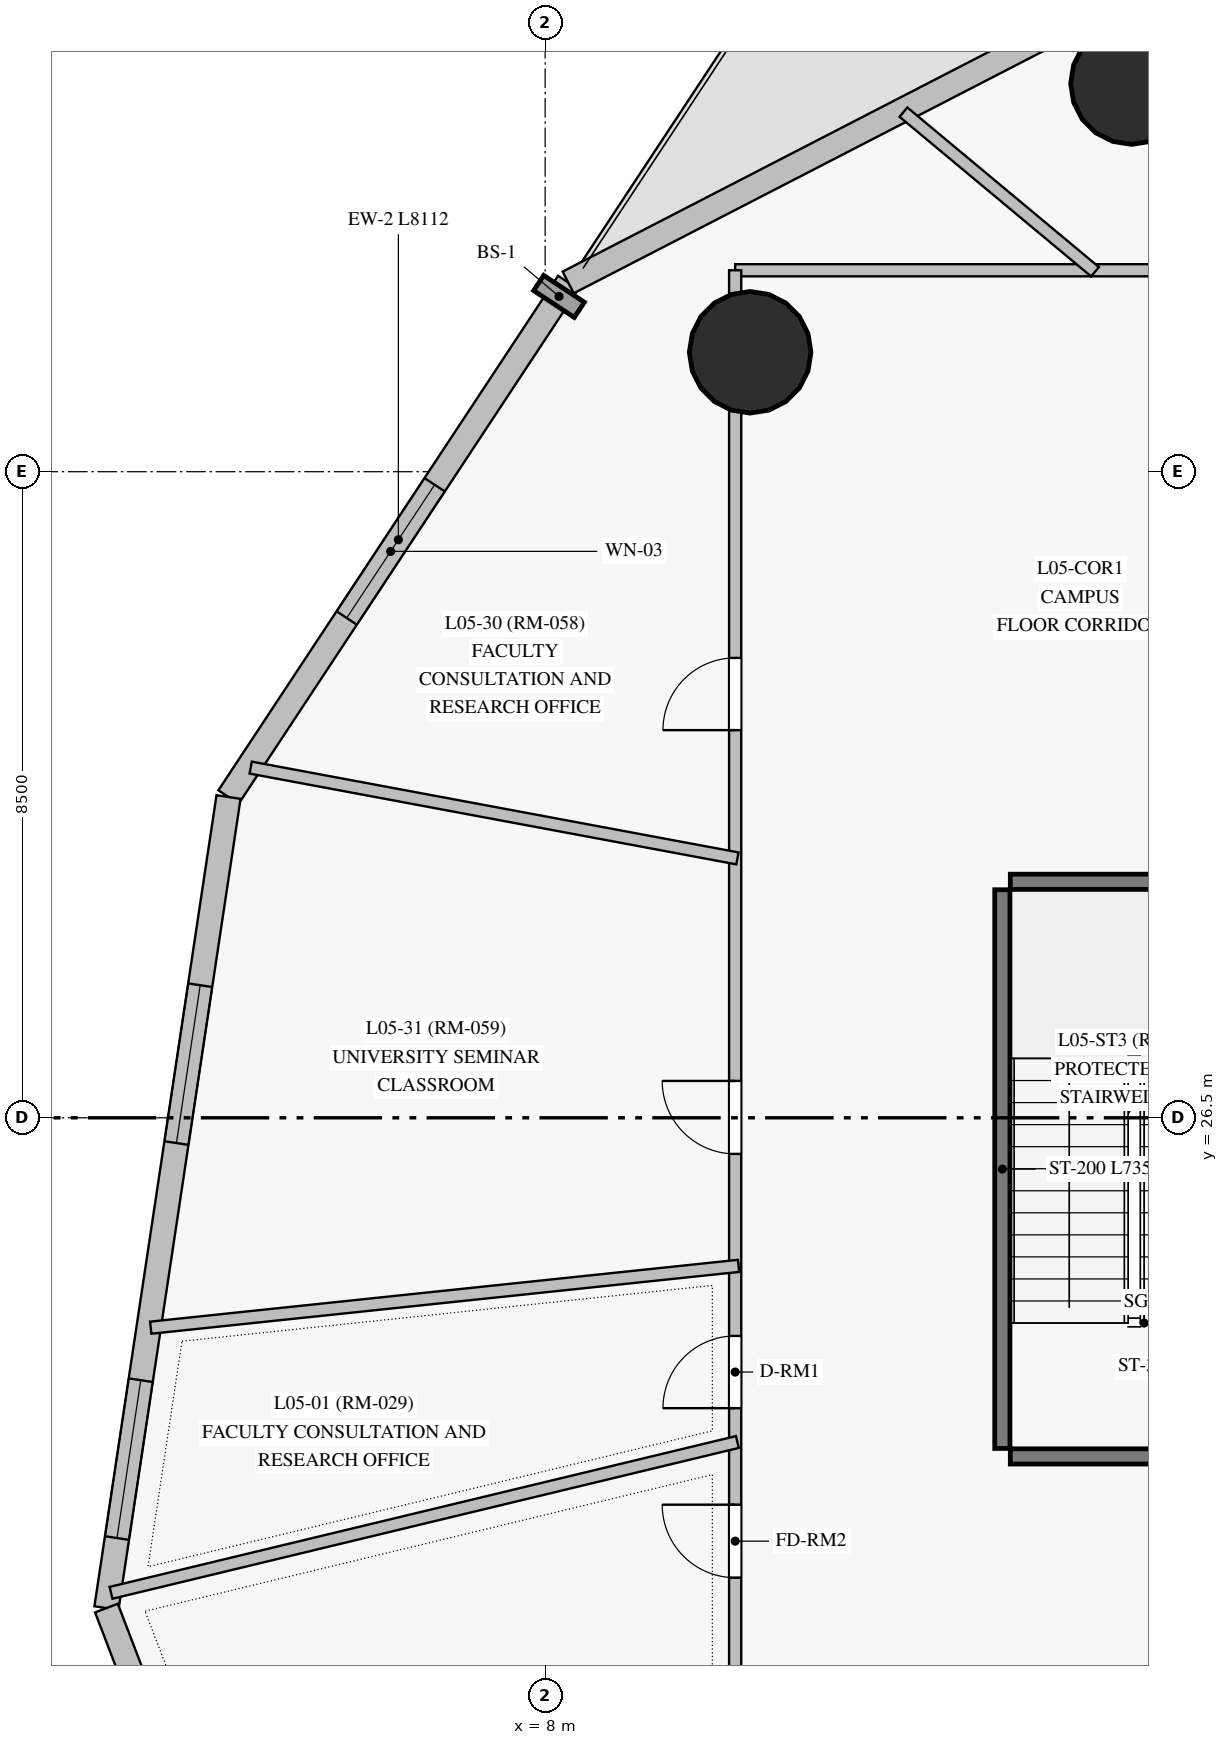
"""IFC4 building model, lengths in metres.
Left out: names, types, materials, properties, quantities, classifications, styles, units other than length and angle.
Written with IfcOpenShell. Run it as: python <this file> out.ifc"""

import sys

from ifc_helpers import new_model, si_unit, direction, frame, frame_2d, origin, origin_with_axes, origin_2d, place, context, subcontext, project, spatial, rectangle, circle, extrude, source, transform, mapped, element, fill, save


model = new_model("IFC4")
c1 = context("Model", 3, precision=1e-05, world=origin(), true_north=direction((0.0, 1.0)))
c2 = subcontext(c1, "Body", "Model", "MODEL_VIEW")
j1 = project(units=[si_unit("LENGTHUNIT", "METRE"), si_unit("PLANEANGLEUNIT", "RADIAN")], contexts=[c1])
p1 = place(None, origin())
s1 = spatial("IfcSite", under=j1, at=p1, CompositionType="ELEMENT")
p2 = place(p1, origin())
s2 = spatial("IfcBuilding", under=s1, at=p2, CompositionType="ELEMENT")
p3 = place(p2, frame((0.0, 0.0, 22.5)))
s3 = spatial("IfcBuildingStorey", under=s2, at=p3, CompositionType="ELEMENT", Elevation=22.5)
m1 = source(origin_with_axes(), c2, "Body", "SweptSolid", [
    extrude(circle(Radius=0.8, at=origin_2d()), origin(), (0.0, 0.0, 1.0), 4.0),
])
for number, where, z_axis, x_axis in (
    (1, (15.714, 40.106, 0.0), (0.0, 0.0, 1.0), (1.0, 0.0, 0.0)),
    (2, (10.697, 36.571, 0.0), (0.0, 0.0, 1.0), (1.0, 0.0, 0.0)),
):
    element("IfcColumn", number, at=place(p3, frame(where, z_axis=z_axis, x_axis=x_axis)), inside=s3, PredefinedType="COLUMN", context=c2, shape_type="MappedRepresentation", body=[
        mapped(m1, transform((0.0, 0.0, 0.0), scale=1.0)),
    ])
p4 = place(p3, frame((8.303, 37.49, 0.0), z_axis=(0.0, 0.0, 1.0), x_axis=(-0.550902166831, -0.83456983086, 0.0)))
e3 = element("IfcWall", 3, at=p4, inside=s3, PredefinedType="SOLIDWALL", context=c2, shape_type="SweptSolid", body=[
    extrude(rectangle(XDim=8.112, YDim=0.32, at=frame_2d((4.056, 0.0))), origin(), (0.0, 0.0, 1.0), 3.75),
])
p5 = place(p4, frame((3.189, 0.0, 0.85)))
e4 = element("IfcOpeningElement", 4, at=p5, cuts=e3, PredefinedType="OPENING", context=c2, shape_type="SweptSolid", body=[
    extrude(rectangle(XDim=2.1, YDim=1.95, at=frame_2d((1.05, 0.975))), frame((0.0, 0.17, 0.0), z_axis=(0.0, -1.0, 0.0), x_axis=(1.0, 0.0, 0.0)), (0.0, 0.0, 1.0), 0.34),
])
p6 = place(p3, frame((3.835, 30.72, 0.0), z_axis=(0.0, 0.0, 1.0), x_axis=(-0.148854906236, -0.988859048039, 0.0)))
e5 = element("IfcWall", 5, at=p6, inside=s3, PredefinedType="SOLIDWALL", context=c2, shape_type="SweptSolid", body=[
    extrude(rectangle(XDim=10.79, YDim=0.32, at=frame_2d((5.395, 0.0))), origin(), (0.0, 0.0, 1.0), 3.75),
])
p7 = place(p6, frame((2.503, 0.0, 0.85)))
e6 = element("IfcOpeningElement", 6, at=p7, cuts=e5, PredefinedType="OPENING", context=c2, shape_type="SweptSolid", body=[
    extrude(rectangle(XDim=2.1, YDim=1.95, at=frame_2d((1.05, 0.975))), frame((0.0, 0.17, 0.0), z_axis=(0.0, -1.0, 0.0), x_axis=(1.0, 0.0, 0.0)), (0.0, 0.0, 1.0), 0.34),
])
p8 = place(p6, frame((7.758, 0.0, 0.85)))
e7 = element("IfcOpeningElement", 7, at=p8, cuts=e5, PredefinedType="OPENING", context=c2, shape_type="SweptSolid", body=[
    extrude(rectangle(XDim=2.1, YDim=1.95, at=frame_2d((1.05, 0.975))), frame((0.0, 0.17, 0.0), z_axis=(0.0, -1.0, 0.0), x_axis=(1.0, 0.0, 0.0)), (0.0, 0.0, 1.0), 0.34),
])
p9 = place(p3, frame((2.229, 20.05, 0.0), z_axis=(0.0, 0.0, 1.0), x_axis=(0.357658091535, -0.933852605907, 0.0)))
e8 = element("IfcWall", 8, at=p9, inside=s3, PredefinedType="SOLIDWALL", context=c2, shape_type="SweptSolid", body=[
    extrude(rectangle(XDim=13.391, YDim=0.32, at=frame_2d((6.696, 0.0))), origin(), (0.0, 0.0, 1.0), 3.75),
])
p10 = place(p9, frame((2.704, 0.0, 0.85)))
e9 = element("IfcOpeningElement", 9, at=p10, cuts=e8, PredefinedType="OPENING", context=c2, shape_type="SweptSolid", body=[
    extrude(rectangle(XDim=2.1, YDim=1.95, at=frame_2d((1.05, 0.975))), frame((0.0, 0.17, 0.0), z_axis=(0.0, -1.0, 0.0), x_axis=(1.0, 0.0, 0.0)), (0.0, 0.0, 1.0), 0.34),
])
p11 = place(p9, frame((9.233, 0.0, 0.85)))
e10 = element("IfcOpeningElement", 10, at=p11, cuts=e8, PredefinedType="OPENING", context=c2, shape_type="SweptSolid", body=[
    extrude(rectangle(XDim=2.1, YDim=1.95, at=frame_2d((1.05, 0.975))), frame((0.0, 0.17, 0.0), z_axis=(0.0, -1.0, 0.0), x_axis=(1.0, 0.0, 0.0)), (0.0, 0.0, 1.0), 0.34),
])
p12 = place(p3, frame((31.258, 49.327, 0.0), z_axis=(0.0, 0.0, 1.0), x_axis=(-0.888776453035, -0.458340939182, 0.0)))
e11 = element("IfcWall", 11, at=p12, inside=s3, PredefinedType="SOLIDWALL", context=c2, shape_type="SweptSolid", body=[
    extrude(rectangle(XDim=25.827, YDim=0.32, at=frame_2d((12.913, 0.0))), origin(), (0.0, 0.0, 1.0), 3.42),
])
p13 = place(p12, frame((13.281, 0.0, 0.85)))
e12 = element("IfcOpeningElement", 12, at=p13, cuts=e11, PredefinedType="OPENING", context=c2, shape_type="SweptSolid", body=[
    extrude(rectangle(XDim=2.1, YDim=1.95, at=frame_2d((1.05, 0.975))), frame((0.0, 0.17, 0.0), z_axis=(0.0, -1.0, 0.0), x_axis=(1.0, 0.0, 0.0)), (0.0, 0.0, 1.0), 0.34),
])
p14 = place(p12, frame((9.16, 0.0, 0.0)))
e13 = element("IfcOpeningElement", 13, at=p14, cuts=e11, PredefinedType="OPENING", context=c2, shape_type="SweptSolid", body=[
    extrude(rectangle(XDim=1.05, YDim=2.12, at=frame_2d((0.525, 1.06))), frame((0.0, 0.17, 0.0), z_axis=(0.0, -1.0, 0.0), x_axis=(1.0, 0.0, 0.0)), (0.0, 0.0, 1.0), 0.34),
])
p15 = place(p3, frame((14.015, 22.15, 0.0), z_axis=(0.0, 0.0, 1.0), x_axis=(0.0, 1.0, 0.0)))
e14 = element("IfcWall", 14, at=p15, inside=s3, PredefinedType="SHEAR", context=c2, shape_type="SweptSolid", body=[
    extrude(rectangle(XDim=7.35, YDim=0.2, at=frame_2d((3.675, 0.0))), origin(), (0.0, 0.0, 1.0), 3.75),
])
for number, where, z_axis, x_axis in (
    (15, (14.12, 22.045, 0.0), (0.0, 0.0, 1.0), (1.0, 0.0, 0.0)),
    (16, (14.12, 29.605, 0.0), (0.0, 0.0, 1.0), (1.0, 0.0, 0.0)),
):
    element("IfcWall", number, at=place(p3, frame(where, z_axis=z_axis, x_axis=x_axis)), inside=s3, PredefinedType="SHEAR", context=c2, shape_type="SweptSolid", body=[
        extrude(rectangle(XDim=3.26, YDim=0.2, at=frame_2d((1.63, 0.0))), origin(), (0.0, 0.0, 1.0), 3.75),
    ])
p16 = place(p3, frame((10.5, 37.65, 0.0), z_axis=(0.0, 0.0, 1.0), x_axis=(1.0, 0.0, 0.0)))
e17 = element("IfcWall", 17, at=p16, inside=s3, PredefinedType="PARTITIONING", context=c2, shape_type="SweptSolid", body=[
    extrude(rectangle(XDim=29.75, YDim=0.16, at=frame_2d((14.875, 0.0))), origin(), (0.0, 0.0, 1.0), 3.15),
])
p17 = place(p16, frame((26.813, 0.0, 0.0)))
e18 = element("IfcOpeningElement", 18, at=p17, cuts=e17, PredefinedType="OPENING", context=c2, shape_type="SweptSolid", body=[
    extrude(rectangle(XDim=0.96, YDim=2.15, at=frame_2d((0.48, 1.075))), frame((0.0, 0.09, 0.0), z_axis=(0.0, -1.0, 0.0), x_axis=(1.0, 0.0, 0.0)), (0.0, 0.0, 1.0), 0.18),
])
p18 = place(p16, frame((24.312, 0.0, 0.0)))
e19 = element("IfcOpeningElement", 19, at=p18, cuts=e17, PredefinedType="OPENING", context=c2, shape_type="SweptSolid", body=[
    extrude(rectangle(XDim=0.95, YDim=2.15, at=frame_2d((0.475, 1.075))), frame((0.0, 0.09, 0.0), z_axis=(0.0, -1.0, 0.0), x_axis=(1.0, 0.0, 0.0)), (0.0, 0.0, 1.0), 0.18),
])
p19 = place(p16, frame((21.84, 0.0, 0.0)))
e20 = element("IfcOpeningElement", 20, at=p19, cuts=e17, PredefinedType="OPENING", context=c2, shape_type="SweptSolid", body=[
    extrude(rectangle(XDim=0.95, YDim=2.15, at=frame_2d((0.475, 1.075))), frame((0.0, 0.09, 0.0), z_axis=(0.0, -1.0, 0.0), x_axis=(1.0, 0.0, 0.0)), (0.0, 0.0, 1.0), 0.18),
])
p20 = place(p16, frame((19.498, 0.0, 0.0)))
e21 = element("IfcOpeningElement", 21, at=p20, cuts=e17, PredefinedType="OPENING", context=c2, shape_type="SweptSolid", body=[
    extrude(rectangle(XDim=0.96, YDim=2.15, at=frame_2d((0.48, 1.075))), frame((0.0, 0.09, 0.0), z_axis=(0.0, -1.0, 0.0), x_axis=(1.0, 0.0, 0.0)), (0.0, 0.0, 1.0), 0.18),
])
p21 = place(p16, frame((17.272, 0.0, 0.0)))
e22 = element("IfcOpeningElement", 22, at=p21, cuts=e17, PredefinedType="OPENING", context=c2, shape_type="SweptSolid", body=[
    extrude(rectangle(XDim=0.95, YDim=2.15, at=frame_2d((0.475, 1.075))), frame((0.0, 0.09, 0.0), z_axis=(0.0, -1.0, 0.0), x_axis=(1.0, 0.0, 0.0)), (0.0, 0.0, 1.0), 0.18),
])
p22 = place(p16, frame((15.625, 0.0, 0.0)))
e23 = element("IfcOpeningElement", 23, at=p22, cuts=e17, PredefinedType="OPENING", context=c2, shape_type="SweptSolid", body=[
    extrude(rectangle(XDim=0.95, YDim=2.15, at=frame_2d((0.475, 1.075))), frame((0.0, 0.09, 0.0), z_axis=(0.0, -1.0, 0.0), x_axis=(1.0, 0.0, 0.0)), (0.0, 0.0, 1.0), 0.18),
])
p23 = place(p16, frame((14.4, 0.0, 0.0)))
e24 = element("IfcOpeningElement", 24, at=p23, cuts=e17, PredefinedType="OPENING", context=c2, shape_type="SweptSolid", body=[
    extrude(rectangle(XDim=0.96, YDim=2.15, at=frame_2d((0.48, 1.075))), frame((0.0, 0.09, 0.0), z_axis=(0.0, -1.0, 0.0), x_axis=(1.0, 0.0, 0.0)), (0.0, 0.0, 1.0), 0.18),
])
p24 = place(p16, frame((9.938, 0.0, 0.0)))
e25 = element("IfcOpeningElement", 25, at=p24, cuts=e17, PredefinedType="OPENING", context=c2, shape_type="SweptSolid", body=[
    extrude(rectangle(XDim=0.95, YDim=2.15, at=frame_2d((0.475, 1.075))), frame((0.0, 0.09, 0.0), z_axis=(0.0, -1.0, 0.0), x_axis=(1.0, 0.0, 0.0)), (0.0, 0.0, 1.0), 0.18),
])
p25 = place(p3, frame((10.5, 15.35, 0.0), z_axis=(0.0, 0.0, 1.0), x_axis=(0.0, 1.0, 0.0)))
e26 = element("IfcWall", 26, at=p25, inside=s3, PredefinedType="PARTITIONING", context=c2, shape_type="SweptSolid", body=[
    extrude(rectangle(XDim=22.3, YDim=0.16, at=frame_2d((11.15, 0.0))), origin(), (0.0, 0.0, 1.0), 3.15),
])
p26 = place(p25, frame((7.33, 0.0, 0.0)))
e27 = element("IfcOpeningElement", 27, at=p26, cuts=e26, PredefinedType="OPENING", context=c2, shape_type="SweptSolid", body=[
    extrude(rectangle(XDim=0.95, YDim=2.15, at=frame_2d((0.475, 1.075))), frame((0.0, 0.09, 0.0), z_axis=(0.0, -1.0, 0.0), x_axis=(1.0, 0.0, 0.0)), (0.0, 0.0, 1.0), 0.18),
])
p27 = place(p25, frame((5.1, 0.0, 0.0)))
e28 = element("IfcOpeningElement", 28, at=p27, cuts=e26, PredefinedType="OPENING", context=c2, shape_type="SweptSolid", body=[
    extrude(rectangle(XDim=0.96, YDim=2.15, at=frame_2d((0.48, 1.075))), frame((0.0, 0.09, 0.0), z_axis=(0.0, -1.0, 0.0), x_axis=(1.0, 0.0, 0.0)), (0.0, 0.0, 1.0), 0.18),
])
p28 = place(p25, frame((16.25, 0.0, 0.0)))
e29 = element("IfcOpeningElement", 29, at=p28, cuts=e26, PredefinedType="OPENING", context=c2, shape_type="SweptSolid", body=[
    extrude(rectangle(XDim=0.95, YDim=2.15, at=frame_2d((0.475, 1.075))), frame((0.0, 0.09, 0.0), z_axis=(0.0, -1.0, 0.0), x_axis=(1.0, 0.0, 0.0)), (0.0, 0.0, 1.0), 0.18),
])
p29 = place(p25, frame((10.675, 0.0, 0.0)))
e30 = element("IfcOpeningElement", 30, at=p29, cuts=e26, PredefinedType="OPENING", context=c2, shape_type="SweptSolid", body=[
    extrude(rectangle(XDim=0.96, YDim=2.15, at=frame_2d((0.48, 1.075))), frame((0.0, 0.09, 0.0), z_axis=(0.0, -1.0, 0.0), x_axis=(1.0, 0.0, 0.0)), (0.0, 0.0, 1.0), 0.18),
])
p30 = place(p3, frame((10.529, 22.235, 0.0), z_axis=(0.0, 0.0, 1.0), x_axis=(-0.972215261487, -0.234088627088, 0.0)))
e31 = element("IfcWall", 31, at=p30, inside=s3, PredefinedType="PARTITIONING", context=c2, shape_type="SweptSolid", body=[
    extrude(rectangle(XDim=8.476, YDim=0.16, at=frame_2d((4.238, 0.0))), origin(), (0.0, 0.0, 1.0), 3.75),
])
p31 = place(p3, frame((2.811, 23.739, 0.0), z_axis=(0.0, 0.0, 1.0), x_axis=(0.994516972569, 0.104575289969, 0.0)))
e32 = element("IfcWall", 32, at=p31, inside=s3, PredefinedType="PARTITIONING", context=c2, shape_type="SweptSolid", body=[
    extrude(rectangle(XDim=7.777, YDim=0.16, at=frame_2d((3.888, 0.0))), origin(), (0.0, 0.0, 1.0), 3.75),
])
p32 = place(p3, frame((10.53, 29.913, 0.0), z_axis=(0.0, 0.0, 1.0), x_axis=(-0.983053316056, 0.18331987833, 0.0)))
e33 = element("IfcWall", 33, at=p32, inside=s3, PredefinedType="PARTITIONING", context=c2, shape_type="SweptSolid", body=[
    extrude(rectangle(XDim=6.514, YDim=0.16, at=frame_2d((3.257, 0.0))), origin(), (0.0, 0.0, 1.0), 3.75),
])
p33 = place(p3, frame((15.234, 37.631, 0.0), z_axis=(0.0, 0.0, 1.0), x_axis=(-0.768282285562, 0.640111185413, 0.0)))
e34 = element("IfcWall", 34, at=p33, inside=s3, PredefinedType="PARTITIONING", context=c2, shape_type="SweptSolid", body=[
    extrude(rectangle(XDim=3.28, YDim=0.16, at=frame_2d((1.64, 0.0))), origin(), (0.0, 0.0, 1.0), 3.75),
])
m2 = source(origin_with_axes(), c2, "Body", "SweptSolid", [
    extrude(rectangle(XDim=2.1, YDim=1.95, at=frame_2d((1.05, 0.975))), frame((0.0, 0.03, 0.0), z_axis=(0.0, -1.0, 0.0), x_axis=(1.0, 0.0, 0.0)), (0.0, 0.0, 1.0), 0.06),
])
p34 = place(p5, origin())
e35 = element("IfcWindow", 35, at=p34, inside=s3, PartitioningType="SINGLE_PANEL", PredefinedType="WINDOW", context=c2, shape_type="MappedRepresentation", body=[
    mapped(m2, transform((0.0, 0.0, 0.0), scale=1.0)),
])
fill(e4, e35)
p35 = place(p7, origin())
e36 = element("IfcWindow", 36, at=p35, inside=s3, PartitioningType="SINGLE_PANEL", PredefinedType="WINDOW", context=c2, shape_type="MappedRepresentation", body=[
    mapped(m2, transform((0.0, 0.0, 0.0), scale=1.0)),
])
fill(e6, e36)
p36 = place(p8, origin())
e37 = element("IfcWindow", 37, at=p36, inside=s3, PartitioningType="SINGLE_PANEL", PredefinedType="WINDOW", context=c2, shape_type="MappedRepresentation", body=[
    mapped(m2, transform((0.0, 0.0, 0.0), scale=1.0)),
])
fill(e7, e37)
m3 = source(origin_with_axes(), c2, "Body", "SweptSolid", [
    extrude(rectangle(XDim=0.95, YDim=2.15, at=frame_2d((0.475, 1.075))), frame((0.0, 0.025, 0.0), z_axis=(0.0, -1.0, 0.0), x_axis=(1.0, 0.0, 0.0)), (0.0, 0.0, 1.0), 0.05),
])
p37 = place(p26, origin())
e38 = element("IfcDoor", 38, at=p37, inside=s3, OperationType="SINGLE_SWING_LEFT", PredefinedType="DOOR", context=c2, shape_type="MappedRepresentation", body=[
    mapped(m3, transform((0.0, 0.0, 0.0), scale=1.0)),
])
fill(e27, e38)
m4 = source(origin_with_axes(), c2, "Body", "SweptSolid", [
    extrude(rectangle(XDim=0.96, YDim=2.15, at=frame_2d((0.48, 1.075))), frame((0.0, 0.025, 0.0), z_axis=(0.0, -1.0, 0.0), x_axis=(1.0, 0.0, 0.0)), (0.0, 0.0, 1.0), 0.05),
])
p38 = place(p27, origin())
e39 = element("IfcDoor", 39, at=p38, inside=s3, OperationType="SINGLE_SWING_RIGHT", PredefinedType="DOOR", context=c2, shape_type="MappedRepresentation", body=[
    mapped(m4, transform((0.0, 0.0, 0.0), scale=1.0)),
])
fill(e28, e39)
p39 = place(p28, origin())
e40 = element("IfcDoor", 40, at=p39, inside=s3, OperationType="SINGLE_SWING_LEFT", PredefinedType="DOOR", context=c2, shape_type="MappedRepresentation", body=[
    mapped(m3, transform((0.0, 0.0, 0.0), scale=1.0)),
])
fill(e29, e40)
p40 = place(p29, origin())
e41 = element("IfcDoor", 41, at=p40, inside=s3, OperationType="SINGLE_SWING_RIGHT", PredefinedType="DOOR", context=c2, shape_type="MappedRepresentation", body=[
    mapped(m4, transform((0.0, 0.0, 0.0), scale=1.0)),
])
fill(e30, e41)
save(model, sys.argv[1])
